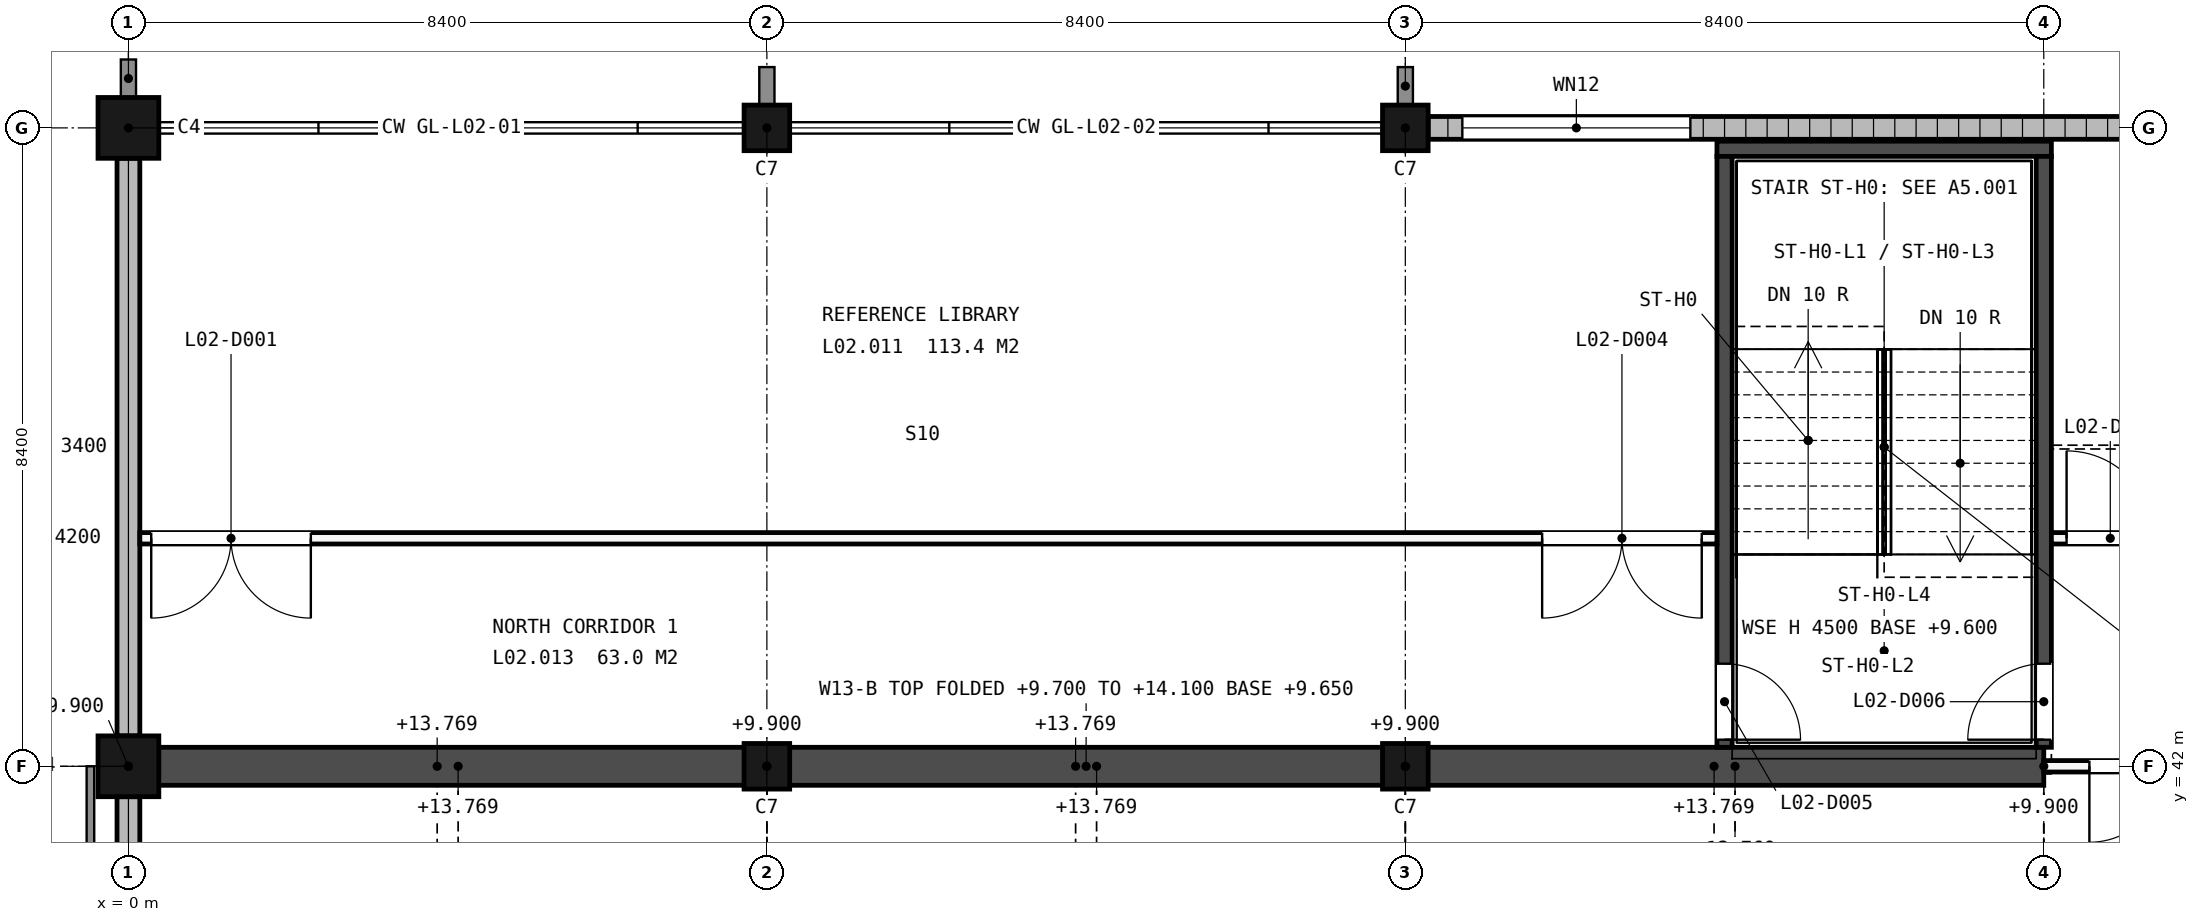
"""IFC4 building model, lengths in metres.
Left out: names, types, materials, properties, quantities, classifications, styles, units other than length and angle.
Written with IfcOpenShell. Run it as: python <this file> out.ifc"""

import sys

from ifc_helpers import new_model, si_unit, direction, frame, frame_2d, origin, origin_2d, place, context, subcontext, project, spatial, polyline, rectangle, outline, extrude, element, fill, save


model = new_model("IFC4")
c1 = context("Model", 3, precision=1e-05, world=origin(), true_north=direction((0.0, 1.0)))
c2 = subcontext(c1, "Body", "Model", "MODEL_VIEW")
j1 = project(units=[si_unit("LENGTHUNIT", "METRE"), si_unit("PLANEANGLEUNIT", "RADIAN")], contexts=[c1])
p1 = place(None, origin())
s1 = spatial("IfcSite", under=j1, at=p1, CompositionType="ELEMENT")
p2 = place(p1, origin())
s2 = spatial("IfcBuilding", under=s1, at=p2, CompositionType="ELEMENT")
p3 = place(p2, frame((0.0, 0.0, 9.9)))
s3 = spatial("IfcBuildingStorey", under=s2, at=p3, CompositionType="ELEMENT", Elevation=9.9)
for number, where, z_axis, x_axis in (
    (1, (0.0, 42.0, -0.25), (0.0, 0.0, 1.0), (1.0, 0.0, 0.0)),
    (2, (0.0, 50.4, -0.25), (0.0, 0.0, 1.0), (1.0, 0.0, 0.0)),
):
    element("IfcColumn", number, at=place(p3, frame(where, z_axis=z_axis, x_axis=x_axis)), inside=s3, PredefinedType="COLUMN", context=c2, shape_type="SweptSolid", body=[
        extrude(rectangle(XDim=0.8, YDim=0.8, at=origin_2d()), origin(), (0.0, 0.0, 1.0), 4.45),
    ])
for number, where, z_axis, x_axis in (
    (3, (8.4, 42.0, -0.25), (0.0, 0.0, 1.0), (1.0, 0.0, 0.0)),
    (4, (8.4, 50.4, -0.25), (0.0, 0.0, 1.0), (1.0, 0.0, 0.0)),
    (5, (16.8, 42.0, -0.25), (0.0, 0.0, 1.0), (1.0, 0.0, 0.0)),
    (6, (16.8, 50.4, -0.25), (0.0, 0.0, 1.0), (1.0, 0.0, 0.0)),
):
    element("IfcColumn", number, at=place(p3, frame(where, z_axis=z_axis, x_axis=x_axis)), inside=s3, PredefinedType="COLUMN", context=c2, shape_type="SweptSolid", body=[
        extrude(rectangle(XDim=0.6, YDim=0.6, at=origin_2d()), origin(), (0.0, 0.0, 1.0), 4.45),
    ])
p4 = place(p3, frame((0.0, 42.0, -0.25), z_axis=(0.0, 0.0, 1.0), x_axis=(1.0, 0.0, 0.0)))
e7 = element("IfcWall", 7, at=p4, inside=s3, PredefinedType="SHEAR", context=c2, shape_type="SweptSolid", body=[
    extrude(outline(polyline([(0.0, 0.0), (25.2, 0.0), (25.201, 0.05), (25.2, 4.45), (21.0, 4.45), (20.999, 3.973), (16.8, 0.05), (12.6, 3.974), (8.4, 0.05), (4.2, 3.974), (0.0, 0.05), (0.0, 0.0)])), frame((0.0, 0.25, 0.0), z_axis=(0.0, -1.0, 0.0), x_axis=(1.0, 0.0, 0.0)), (0.0, 0.0, 1.0), 0.5),
])
p5 = place(p3, frame((17.1, 50.4, 0.0), z_axis=(0.0, 0.0, 1.0), x_axis=(1.0, 0.0, 0.0)))
e8 = element("IfcWall", 8, at=p5, inside=s3, PredefinedType="STANDARD", context=c2, shape_type="SweptSolid", body=[
    extrude(rectangle(XDim=16.2, YDim=0.3, at=frame_2d((8.1, 0.0))), origin(), (0.0, 0.0, 1.0), 3.55),
])
p6 = place(p5, frame((0.45, 0.0, 2.4)))
e9 = element("IfcOpeningElement", 9, at=p6, cuts=e8, PredefinedType="OPENING", context=c2, shape_type="SweptSolid", body=[
    extrude(rectangle(XDim=3.0, YDim=0.9, at=frame_2d((1.5, 0.45))), frame((0.0, 0.16, 0.0), z_axis=(0.0, -1.0, 0.0), x_axis=(1.0, 0.0, 0.0)), (0.0, 0.0, 1.0), 0.32),
])
p7 = place(p5, frame((10.05, 0.0, 0.9)))
e10 = element("IfcOpeningElement", 10, at=p7, cuts=e8, PredefinedType="OPENING", context=c2, shape_type="SweptSolid", body=[
    extrude(rectangle(XDim=4.2, YDim=1.5, at=frame_2d((2.1, 0.75))), frame((0.0, 0.16, 0.0), z_axis=(0.0, -1.0, 0.0), x_axis=(1.0, 0.0, 0.0)), (0.0, 0.0, 1.0), 0.32),
])
p8 = place(p3, frame((0.0, 8.8, 0.0), z_axis=(0.0, 0.0, 1.0), x_axis=(0.0, 1.0, 0.0)))
e11 = element("IfcWall", 11, at=p8, inside=s3, PredefinedType="STANDARD", context=c2, shape_type="SweptSolid", body=[
    extrude(rectangle(XDim=32.8, YDim=0.3, at=frame_2d((16.4, 0.0))), origin(), (0.0, 0.0, 1.0), 4.5),
])
p9 = place(p3, frame((0.0, 42.4, 0.0), z_axis=(0.0, 0.0, 1.0), x_axis=(0.0, 1.0, 0.0)))
e12 = element("IfcWall", 12, at=p9, inside=s3, PredefinedType="STANDARD", context=c2, shape_type="SweptSolid", body=[
    extrude(rectangle(XDim=7.6, YDim=0.3, at=frame_2d((3.8, 0.0))), origin(), (0.0, 0.0, 1.0), 3.4),
])
p10 = place(p3, frame((20.9, 50.125, -0.3), z_axis=(0.0, 0.0, 1.0), x_axis=(1.0, 0.0, 0.0)))
e13 = element("IfcWall", 13, at=p10, inside=s3, PredefinedType="SHEAR", context=c2, shape_type="SweptSolid", body=[
    extrude(rectangle(XDim=4.4, YDim=0.2, at=frame_2d((2.2, 0.0))), origin(), (0.0, 0.0, 1.0), 4.5),
])
p11 = place(p3, frame((21.0, 42.25, -0.3), z_axis=(0.0, 0.0, 1.0), x_axis=(0.0, 1.0, 0.0)))
e14 = element("IfcWall", 14, at=p11, inside=s3, PredefinedType="SHEAR", context=c2, shape_type="SweptSolid", body=[
    extrude(rectangle(XDim=7.775, YDim=0.2, at=frame_2d((3.887, 0.0))), origin(), (0.0, 0.0, 1.0), 4.5),
])
p12 = place(p11, frame((0.1, 0.0, 0.3)))
e15 = element("IfcOpeningElement", 15, at=p12, cuts=e14, PredefinedType="OPENING", context=c2, shape_type="SweptSolid", body=[
    extrude(rectangle(XDim=1.0, YDim=2.1, at=frame_2d((0.5, 1.05))), frame((0.0, 0.11, 0.0), z_axis=(0.0, -1.0, 0.0), x_axis=(1.0, 0.0, 0.0)), (0.0, 0.0, 1.0), 0.22),
])
p13 = place(p3, frame((25.2, 42.25, -0.3), z_axis=(0.0, 0.0, 1.0), x_axis=(0.0, 1.0, 0.0)))
e16 = element("IfcWall", 16, at=p13, inside=s3, PredefinedType="SHEAR", context=c2, shape_type="SweptSolid", body=[
    extrude(rectangle(XDim=7.775, YDim=0.2, at=frame_2d((3.887, 0.0))), origin(), (0.0, 0.0, 1.0), 4.5),
])
p14 = place(p13, frame((0.1, 0.0, 0.3)))
e17 = element("IfcOpeningElement", 17, at=p14, cuts=e16, PredefinedType="OPENING", context=c2, shape_type="SweptSolid", body=[
    extrude(rectangle(XDim=1.0, YDim=2.1, at=frame_2d((0.5, 1.05))), frame((0.0, 0.11, 0.0), z_axis=(0.0, -1.0, 0.0), x_axis=(1.0, 0.0, 0.0)), (0.0, 0.0, 1.0), 0.22),
])
p15 = place(p3, frame((25.2, 42.0, 0.0), z_axis=(0.0, 0.0, 1.0), x_axis=(1.0, 0.0, 0.0)))
e18 = element("IfcWall", 18, at=p15, inside=s3, PredefinedType="PARTITIONING", context=c2, shape_type="SweptSolid", body=[
    extrude(rectangle(XDim=12.5, YDim=0.15, at=frame_2d((6.25, 0.0))), origin(), (0.0, 0.0, 1.0), 3.55),
])
p16 = place(p15, frame((0.6, 0.0, 0.0)))
e19 = element("IfcOpeningElement", 19, at=p16, cuts=e18, PredefinedType="OPENING", context=c2, shape_type="SweptSolid", body=[
    extrude(rectangle(XDim=1.0, YDim=2.1, at=frame_2d((0.5, 1.05))), frame((0.0, 0.085, 0.0), z_axis=(0.0, -1.0, 0.0), x_axis=(1.0, 0.0, 0.0)), (0.0, 0.0, 1.0), 0.17),
])
p17 = place(p3, frame((0.15, 45.0, 0.0), z_axis=(0.0, 0.0, 1.0), x_axis=(1.0, 0.0, 0.0)))
e20 = element("IfcWall", 20, at=p17, inside=s3, PredefinedType="PARTITIONING", context=c2, shape_type="SweptSolid", body=[
    extrude(rectangle(XDim=20.75, YDim=0.15, at=frame_2d((10.375, 0.0))), origin(), (0.0, 0.0, 1.0), 4.2),
])
p18 = place(p17, frame((0.15, 0.0, 0.0)))
e21 = element("IfcOpeningElement", 21, at=p18, cuts=e20, PredefinedType="OPENING", context=c2, shape_type="SweptSolid", body=[
    extrude(rectangle(XDim=2.1, YDim=2.25, at=frame_2d((1.05, 1.125))), frame((0.0, 0.085, 0.0), z_axis=(0.0, -1.0, 0.0), x_axis=(1.0, 0.0, 0.0)), (0.0, 0.0, 1.0), 0.17),
])
p19 = place(p17, frame((18.45, 0.0, 0.0)))
e22 = element("IfcOpeningElement", 22, at=p19, cuts=e20, PredefinedType="OPENING", context=c2, shape_type="SweptSolid", body=[
    extrude(rectangle(XDim=2.1, YDim=2.25, at=frame_2d((1.05, 1.125))), frame((0.0, 0.085, 0.0), z_axis=(0.0, -1.0, 0.0), x_axis=(1.0, 0.0, 0.0)), (0.0, 0.0, 1.0), 0.17),
])
p20 = place(p3, frame((25.3, 45.0, 0.0), z_axis=(0.0, 0.0, 1.0), x_axis=(1.0, 0.0, 0.0)))
e23 = element("IfcWall", 23, at=p20, inside=s3, PredefinedType="PARTITIONING", context=c2, shape_type="SweptSolid", body=[
    extrude(rectangle(XDim=12.4, YDim=0.15, at=frame_2d((6.2, 0.0))), origin(), (0.0, 0.0, 1.0), 4.2),
])
p21 = place(p20, frame((0.2, 0.0, 0.0)))
e24 = element("IfcOpeningElement", 24, at=p21, cuts=e23, PredefinedType="OPENING", context=c2, shape_type="SweptSolid", body=[
    extrude(rectangle(XDim=1.15, YDim=2.1, at=frame_2d((0.575, 1.05))), frame((0.0, 0.085, 0.0), z_axis=(0.0, -1.0, 0.0), x_axis=(1.0, 0.0, 0.0)), (0.0, 0.0, 1.0), 0.17),
])
p22 = place(p20, frame((11.05, 0.0, 0.0)))
e25 = element("IfcOpeningElement", 25, at=p22, cuts=e23, PredefinedType="OPENING", context=c2, shape_type="SweptSolid", body=[
    extrude(rectangle(XDim=1.15, YDim=2.1, at=frame_2d((0.575, 1.05))), frame((0.0, 0.085, 0.0), z_axis=(0.0, -1.0, 0.0), x_axis=(1.0, 0.0, 0.0)), (0.0, 0.0, 1.0), 0.17),
])
p23 = place(p6, origin())
e26 = element("IfcWindow", 26, at=p23, inside=s3, PartitioningType="SINGLE_PANEL", PredefinedType="WINDOW", context=c2, shape_type="SweptSolid", body=[
    extrude(rectangle(XDim=3.0, YDim=0.9, at=frame_2d((1.5, 0.45))), frame((0.0, 0.03, 0.0), z_axis=(0.0, -1.0, 0.0), x_axis=(1.0, 0.0, 0.0)), (0.0, 0.0, 1.0), 0.06),
])
fill(e9, e26)
p24 = place(p14, origin())
e27 = element("IfcDoor", 27, at=p24, inside=s3, OperationType="SINGLE_SWING_RIGHT", PredefinedType="DOOR", context=c2, shape_type="SweptSolid", body=[
    extrude(rectangle(XDim=1.0, YDim=2.1, at=frame_2d((0.5, 1.05))), frame((0.0, 0.025, 0.0), z_axis=(0.0, -1.0, 0.0), x_axis=(1.0, 0.0, 0.0)), (0.0, 0.0, 1.0), 0.05),
])
fill(e17, e27)
p25 = place(p12, origin())
e28 = element("IfcDoor", 28, at=p25, inside=s3, OperationType="SINGLE_SWING_LEFT", PredefinedType="DOOR", context=c2, shape_type="SweptSolid", body=[
    extrude(rectangle(XDim=1.0, YDim=2.1, at=frame_2d((0.5, 1.05))), frame((0.0, 0.025, 0.0), z_axis=(0.0, -1.0, 0.0), x_axis=(1.0, 0.0, 0.0)), (0.0, 0.0, 1.0), 0.05),
])
fill(e15, e28)
p26 = place(p18, origin())
e29 = element("IfcDoor", 29, at=p26, inside=s3, OperationType="DOUBLE_DOOR_SINGLE_SWING", PredefinedType="DOOR", context=c2, shape_type="SweptSolid", body=[
    extrude(rectangle(XDim=2.1, YDim=2.25, at=frame_2d((1.05, 1.125))), frame((0.0, 0.025, 0.0), z_axis=(0.0, -1.0, 0.0), x_axis=(1.0, 0.0, 0.0)), (0.0, 0.0, 1.0), 0.05),
])
fill(e21, e29)
p27 = place(p19, origin())
e30 = element("IfcDoor", 30, at=p27, inside=s3, OperationType="DOUBLE_DOOR_SINGLE_SWING", PredefinedType="DOOR", context=c2, shape_type="SweptSolid", body=[
    extrude(rectangle(XDim=2.1, YDim=2.25, at=frame_2d((1.05, 1.125))), frame((0.0, 0.025, 0.0), z_axis=(0.0, -1.0, 0.0), x_axis=(1.0, 0.0, 0.0)), (0.0, 0.0, 1.0), 0.05),
])
fill(e22, e30)
p28 = place(p21, origin())
e31 = element("IfcDoor", 31, at=p28, inside=s3, OperationType="SINGLE_SWING_RIGHT", PredefinedType="DOOR", context=c2, shape_type="SweptSolid", body=[
    extrude(rectangle(XDim=1.15, YDim=2.1, at=frame_2d((0.575, 1.05))), frame((0.0, 0.025, 0.0), z_axis=(0.0, -1.0, 0.0), x_axis=(1.0, 0.0, 0.0)), (0.0, 0.0, 1.0), 0.05),
])
fill(e24, e31)
p29 = place(p16, origin())
e32 = element("IfcDoor", 32, at=p29, inside=s3, OperationType="SINGLE_SWING_LEFT", PredefinedType="DOOR", context=c2, shape_type="SweptSolid", body=[
    extrude(rectangle(XDim=1.0, YDim=2.1, at=frame_2d((0.5, 1.05))), frame((0.0, 0.025, 0.0), z_axis=(0.0, -1.0, 0.0), x_axis=(1.0, 0.0, 0.0)), (0.0, 0.0, 1.0), 0.05),
])
fill(e19, e32)
save(model, sys.argv[1])
